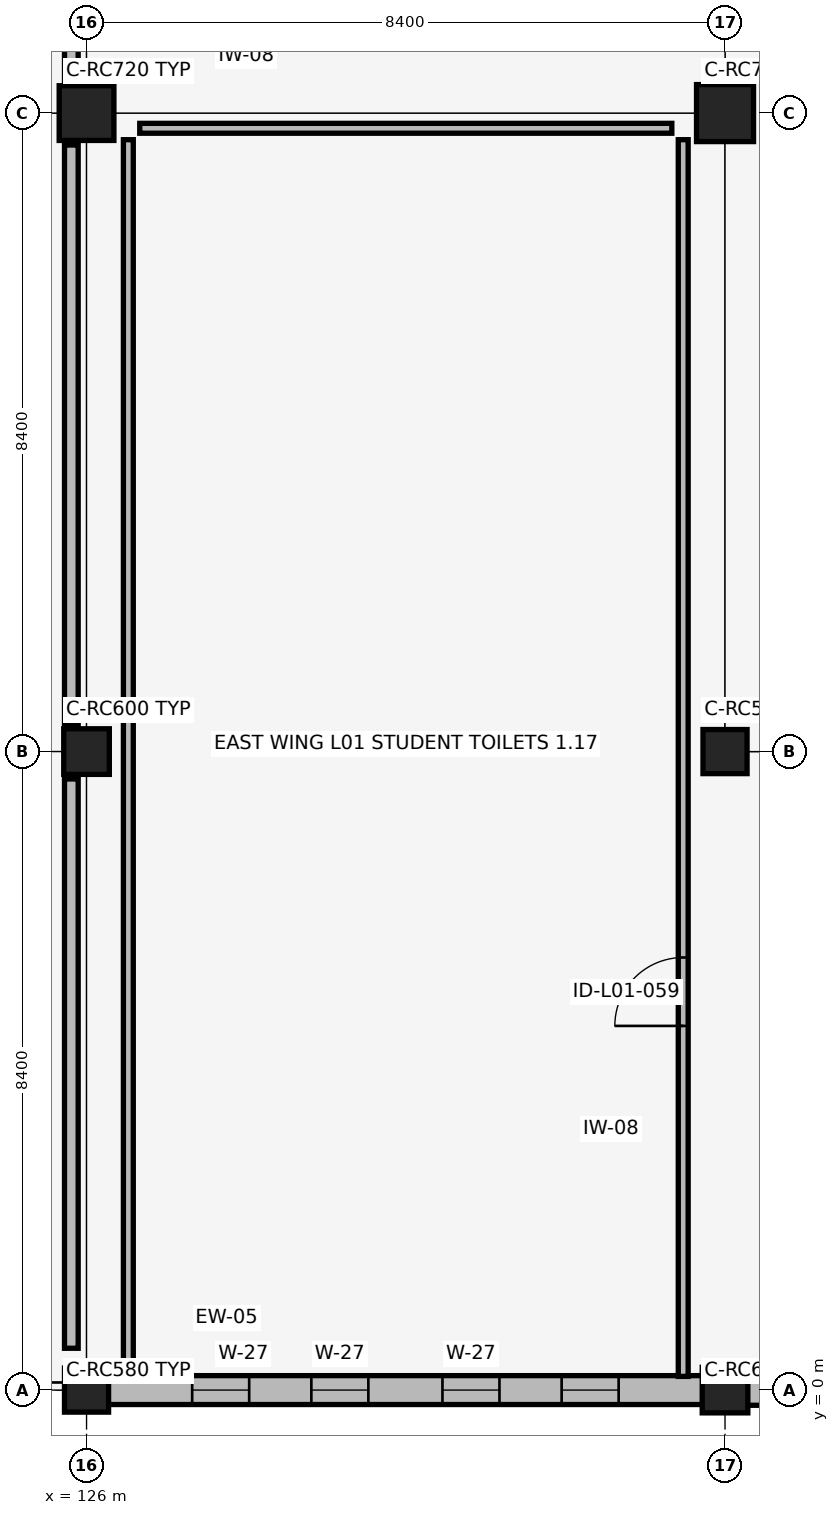
"""IFC4 building model, lengths in metres.
Left out: names, types, materials, properties, quantities, classifications, styles, units other than length and angle.
Written with IfcOpenShell. Run it as: python <this file> out.ifc"""

import sys

from ifc_helpers import new_model, si_unit, direction, frame, frame_2d, origin, origin_2d, place, context, subcontext, project, spatial, rectangle, extrude, element, fill, save


model = new_model("IFC4")
c1 = context("Model", 3, precision=1e-05, world=origin(), true_north=direction((0.0, 1.0)))
c2 = subcontext(c1, "Body", "Model", "MODEL_VIEW")
j1 = project(units=[si_unit("LENGTHUNIT", "METRE"), si_unit("PLANEANGLEUNIT", "RADIAN")], contexts=[c1])
p1 = place(None, origin())
s1 = spatial("IfcSite", under=j1, at=p1, CompositionType="ELEMENT")
p2 = place(p1, origin())
s2 = spatial("IfcBuilding", under=s1, at=p2, CompositionType="ELEMENT")
p3 = place(p2, frame((0.0, 0.0, 5.44)))
s3 = spatial("IfcBuildingStorey", under=s2, at=p3, CompositionType="ELEMENT", Elevation=5.44)
p4 = place(p3, frame((126.0, 0.0, 0.0), z_axis=(0.0, 0.0, 1.0), x_axis=(1.0, 0.0, 0.0)))
e1 = element("IfcColumn", 1, at=p4, inside=s3, PredefinedType="COLUMN", context=c2, shape_type="SweptSolid", body=[
    extrude(rectangle(XDim=0.58, YDim=0.58, at=origin_2d()), origin(), (0.0, 0.0, 1.0), 4.12),
])
p5 = place(p3, frame((126.0, 8.4, 0.0), z_axis=(0.0, 0.0, 1.0), x_axis=(1.0, 0.0, 0.0)))
e2 = element("IfcColumn", 2, at=p5, inside=s3, PredefinedType="COLUMN", context=c2, shape_type="SweptSolid", body=[
    extrude(rectangle(XDim=0.6, YDim=0.6, at=origin_2d()), origin(), (0.0, 0.0, 1.0), 4.12),
])
p6 = place(p3, frame((126.0, 16.8, 0.0), z_axis=(0.0, 0.0, 1.0), x_axis=(1.0, 0.0, 0.0)))
e3 = element("IfcColumn", 3, at=p6, inside=s3, PredefinedType="COLUMN", context=c2, shape_type="SweptSolid", body=[
    extrude(rectangle(XDim=0.72, YDim=0.72, at=origin_2d()), origin(), (0.0, 0.0, 1.0), 4.12),
])
p7 = place(p3, frame((134.4, 0.0, 0.0), z_axis=(0.0, 0.0, 1.0), x_axis=(1.0, 0.0, 0.0)))
e4 = element("IfcColumn", 4, at=p7, inside=s3, PredefinedType="COLUMN", context=c2, shape_type="SweptSolid", body=[
    extrude(rectangle(XDim=0.6, YDim=0.6, at=origin_2d()), origin(), (0.0, 0.0, 1.0), 4.12),
])
p8 = place(p3, frame((134.4, 8.4, 0.0), z_axis=(0.0, 0.0, 1.0), x_axis=(1.0, 0.0, 0.0)))
e5 = element("IfcColumn", 5, at=p8, inside=s3, PredefinedType="COLUMN", context=c2, shape_type="SweptSolid", body=[
    extrude(rectangle(XDim=0.58, YDim=0.58, at=origin_2d()), origin(), (0.0, 0.0, 1.0), 4.12),
])
p9 = place(p3, frame((134.4, 16.8, 0.0), z_axis=(0.0, 0.0, 1.0), x_axis=(1.0, 0.0, 0.0)))
e6 = element("IfcColumn", 6, at=p9, inside=s3, PredefinedType="COLUMN", context=c2, shape_type="SweptSolid", body=[
    extrude(rectangle(XDim=0.75, YDim=0.75, at=origin_2d()), origin(), (0.0, 0.0, 1.0), 4.12),
])
p10 = place(p3, frame((126.275, 0.0, 0.0), z_axis=(0.0, 0.0, 1.0), x_axis=(1.0, 0.0, 0.0)))
e7 = element("IfcWall", 7, at=p10, inside=s3, PredefinedType="SOLIDWALL", context=c2, shape_type="SweptSolid", body=[
    extrude(rectangle(XDim=7.84, YDim=0.38, at=frame_2d((3.92, 0.0))), origin(), (0.0, 0.0, 1.0), 3.38),
])
p11 = place(p10, frame((1.115, 0.0, 0.7)))
e8 = element("IfcOpeningElement", 8, at=p11, cuts=e7, PredefinedType="OPENING", context=c2, shape_type="SweptSolid", body=[
    extrude(rectangle(XDim=0.75, YDim=2.1, at=frame_2d((0.375, 1.05))), frame((0.0, 0.2, 0.0), z_axis=(0.0, -1.0, 0.0), x_axis=(1.0, 0.0, 0.0)), (0.0, 0.0, 1.0), 0.4),
])
p12 = place(p10, frame((2.683, 0.0, 0.7)))
e9 = element("IfcOpeningElement", 9, at=p12, cuts=e7, PredefinedType="OPENING", context=c2, shape_type="SweptSolid", body=[
    extrude(rectangle(XDim=0.75, YDim=2.1, at=frame_2d((0.375, 1.05))), frame((0.0, 0.2, 0.0), z_axis=(0.0, -1.0, 0.0), x_axis=(1.0, 0.0, 0.0)), (0.0, 0.0, 1.0), 0.4),
])
p13 = place(p10, frame((4.407, 0.0, 0.7)))
e10 = element("IfcOpeningElement", 10, at=p13, cuts=e7, PredefinedType="OPENING", context=c2, shape_type="SweptSolid", body=[
    extrude(rectangle(XDim=0.75, YDim=2.1, at=frame_2d((0.375, 1.05))), frame((0.0, 0.2, 0.0), z_axis=(0.0, -1.0, 0.0), x_axis=(1.0, 0.0, 0.0)), (0.0, 0.0, 1.0), 0.4),
])
p14 = place(p10, frame((5.975, 0.0, 0.7)))
e11 = element("IfcOpeningElement", 11, at=p14, cuts=e7, PredefinedType="OPENING", context=c2, shape_type="SweptSolid", body=[
    extrude(rectangle(XDim=0.75, YDim=2.1, at=frame_2d((0.375, 1.05))), frame((0.0, 0.2, 0.0), z_axis=(0.0, -1.0, 0.0), x_axis=(1.0, 0.0, 0.0)), (0.0, 0.0, 1.0), 0.4),
])
p15 = place(p3, frame((134.685, 0.0, 0.0), z_axis=(0.0, 0.0, 1.0), x_axis=(1.0, 0.0, 0.0)))
e12 = element("IfcWall", 12, at=p15, inside=s3, PredefinedType="SOLIDWALL", context=c2, shape_type="SweptSolid", body=[
    extrude(rectangle(XDim=7.84, YDim=0.4, at=frame_2d((3.92, 0.0))), origin(), (0.0, 0.0, 1.0), 3.38),
])
p16 = place(p15, frame((1.115, 0.0, 0.7)))
e13 = element("IfcOpeningElement", 13, at=p16, cuts=e12, PredefinedType="OPENING", context=c2, shape_type="SweptSolid", body=[
    extrude(rectangle(XDim=0.75, YDim=2.1, at=frame_2d((0.375, 1.05))), frame((0.0, 0.21, 0.0), z_axis=(0.0, -1.0, 0.0), x_axis=(1.0, 0.0, 0.0)), (0.0, 0.0, 1.0), 0.42),
])
p17 = place(p15, frame((4.407, 0.0, 0.7)))
e14 = element("IfcOpeningElement", 14, at=p17, cuts=e12, PredefinedType="OPENING", context=c2, shape_type="SweptSolid", body=[
    extrude(rectangle(XDim=0.75, YDim=2.1, at=frame_2d((0.375, 1.05))), frame((0.0, 0.21, 0.0), z_axis=(0.0, -1.0, 0.0), x_axis=(1.0, 0.0, 0.0)), (0.0, 0.0, 1.0), 0.42),
])
p18 = place(p15, frame((5.975, 0.0, 0.7)))
e15 = element("IfcOpeningElement", 15, at=p18, cuts=e12, PredefinedType="OPENING", context=c2, shape_type="SweptSolid", body=[
    extrude(rectangle(XDim=0.75, YDim=2.1, at=frame_2d((0.375, 1.05))), frame((0.0, 0.21, 0.0), z_axis=(0.0, -1.0, 0.0), x_axis=(1.0, 0.0, 0.0)), (0.0, 0.0, 1.0), 0.42),
])
p19 = place(p3, frame((125.8, 0.55, 0.0), z_axis=(0.0, 0.0, 1.0), x_axis=(0.0, 1.0, 0.0)))
e16 = element("IfcWall", 16, at=p19, inside=s3, PredefinedType="PARTITIONING", context=c2, shape_type="SweptSolid", body=[
    extrude(rectangle(XDim=7.49, YDim=0.18, at=frame_2d((3.745, 0.0))), origin(), (0.0, 0.0, 1.0), 3.6),
])
p20 = place(p3, frame((125.8, 8.76, 0.0), z_axis=(0.0, 0.0, 1.0), x_axis=(0.0, 1.0, 0.0)))
e17 = element("IfcWall", 17, at=p20, inside=s3, PredefinedType="PARTITIONING", context=c2, shape_type="SweptSolid", body=[
    extrude(rectangle(XDim=7.62, YDim=0.18, at=frame_2d((3.81, 0.0))), origin(), (0.0, 0.0, 1.0), 3.62),
])
p21 = place(p3, frame((125.8, 17.22, 0.0), z_axis=(0.0, 0.0, 1.0), x_axis=(0.0, 1.0, 0.0)))
e18 = element("IfcWall", 18, at=p21, inside=s3, PredefinedType="PARTITIONING", context=c2, shape_type="SweptSolid", body=[
    extrude(rectangle(XDim=4.23, YDim=0.18, at=frame_2d((2.115, 0.0))), origin(), (0.0, 0.0, 1.0), 3.6),
])
p22 = place(p3, frame((133.85, 0.18, 0.0), z_axis=(0.0, 0.0, 1.0), x_axis=(0.0, 1.0, 0.0)))
e19 = element("IfcWall", 19, at=p22, inside=s3, PredefinedType="PARTITIONING", context=c2, shape_type="SweptSolid", body=[
    extrude(rectangle(XDim=16.27, YDim=0.13, at=frame_2d((8.135, 0.0))), origin(), (0.0, 0.0, 1.0), 3.38),
])
p23 = place(p22, frame((4.611, 0.0, 0.0)))
e20 = element("IfcOpeningElement", 20, at=p23, cuts=e19, PredefinedType="OPENING", context=c2, shape_type="SweptSolid", body=[
    extrude(rectangle(XDim=0.9, YDim=2.1, at=frame_2d((0.45, 1.05))), frame((0.0, 0.075, 0.0), z_axis=(0.0, -1.0, 0.0), x_axis=(1.0, 0.0, 0.0)), (0.0, 0.0, 1.0), 0.15),
])
p24 = place(p3, frame((126.7, 16.6, 0.0), z_axis=(0.0, 0.0, 1.0), x_axis=(1.0, 0.0, 0.0)))
e21 = element("IfcWall", 21, at=p24, inside=s3, PredefinedType="PARTITIONING", context=c2, shape_type="SweptSolid", body=[
    extrude(rectangle(XDim=7.0, YDim=0.13, at=frame_2d((3.5, 0.0))), origin(), (0.0, 0.0, 1.0), 3.34),
])
p25 = place(p3, frame((126.55, 0.18, 0.0), z_axis=(0.0, 0.0, 1.0), x_axis=(0.0, 1.0, 0.0)))
e22 = element("IfcWall", 22, at=p25, inside=s3, PredefinedType="PARTITIONING", context=c2, shape_type="SweptSolid", body=[
    extrude(rectangle(XDim=16.27, YDim=0.13, at=frame_2d((8.135, 0.0))), origin(), (0.0, 0.0, 1.0), 3.38),
])
p26 = place(p11, origin())
e23 = element("IfcWindow", 23, at=p26, inside=s3, PartitioningType="DOUBLE_PANEL_VERTICAL", PredefinedType="WINDOW", context=c2, shape_type="SweptSolid", body=[
    extrude(rectangle(XDim=0.75, YDim=2.1, at=frame_2d((0.375, 1.05))), frame((0.0, 0.03, 0.0), z_axis=(0.0, -1.0, 0.0), x_axis=(1.0, 0.0, 0.0)), (0.0, 0.0, 1.0), 0.06),
])
fill(e8, e23)
p27 = place(p12, origin())
e24 = element("IfcWindow", 24, at=p27, inside=s3, PartitioningType="DOUBLE_PANEL_VERTICAL", PredefinedType="WINDOW", context=c2, shape_type="SweptSolid", body=[
    extrude(rectangle(XDim=0.75, YDim=2.1, at=frame_2d((0.375, 1.05))), frame((0.0, 0.03, 0.0), z_axis=(0.0, -1.0, 0.0), x_axis=(1.0, 0.0, 0.0)), (0.0, 0.0, 1.0), 0.06),
])
fill(e9, e24)
p28 = place(p13, origin())
e25 = element("IfcWindow", 25, at=p28, inside=s3, PartitioningType="DOUBLE_PANEL_VERTICAL", PredefinedType="WINDOW", context=c2, shape_type="SweptSolid", body=[
    extrude(rectangle(XDim=0.75, YDim=2.1, at=frame_2d((0.375, 1.05))), frame((0.0, 0.03, 0.0), z_axis=(0.0, -1.0, 0.0), x_axis=(1.0, 0.0, 0.0)), (0.0, 0.0, 1.0), 0.06),
])
fill(e10, e25)
p29 = place(p14, origin())
e26 = element("IfcWindow", 26, at=p29, inside=s3, PartitioningType="DOUBLE_PANEL_VERTICAL", PredefinedType="WINDOW", context=c2, shape_type="SweptSolid", body=[
    extrude(rectangle(XDim=0.75, YDim=2.1, at=frame_2d((0.375, 1.05))), frame((0.0, 0.03, 0.0), z_axis=(0.0, -1.0, 0.0), x_axis=(1.0, 0.0, 0.0)), (0.0, 0.0, 1.0), 0.06),
])
fill(e11, e26)
p30 = place(p23, origin())
e27 = element("IfcDoor", 27, at=p30, inside=s3, OperationType="SINGLE_SWING_LEFT", PredefinedType="DOOR", context=c2, shape_type="SweptSolid", body=[
    extrude(rectangle(XDim=0.9, YDim=2.1, at=frame_2d((0.45, 1.05))), frame((0.0, 0.025, 0.0), z_axis=(0.0, -1.0, 0.0), x_axis=(1.0, 0.0, 0.0)), (0.0, 0.0, 1.0), 0.05),
])
fill(e20, e27)
save(model, sys.argv[1])
